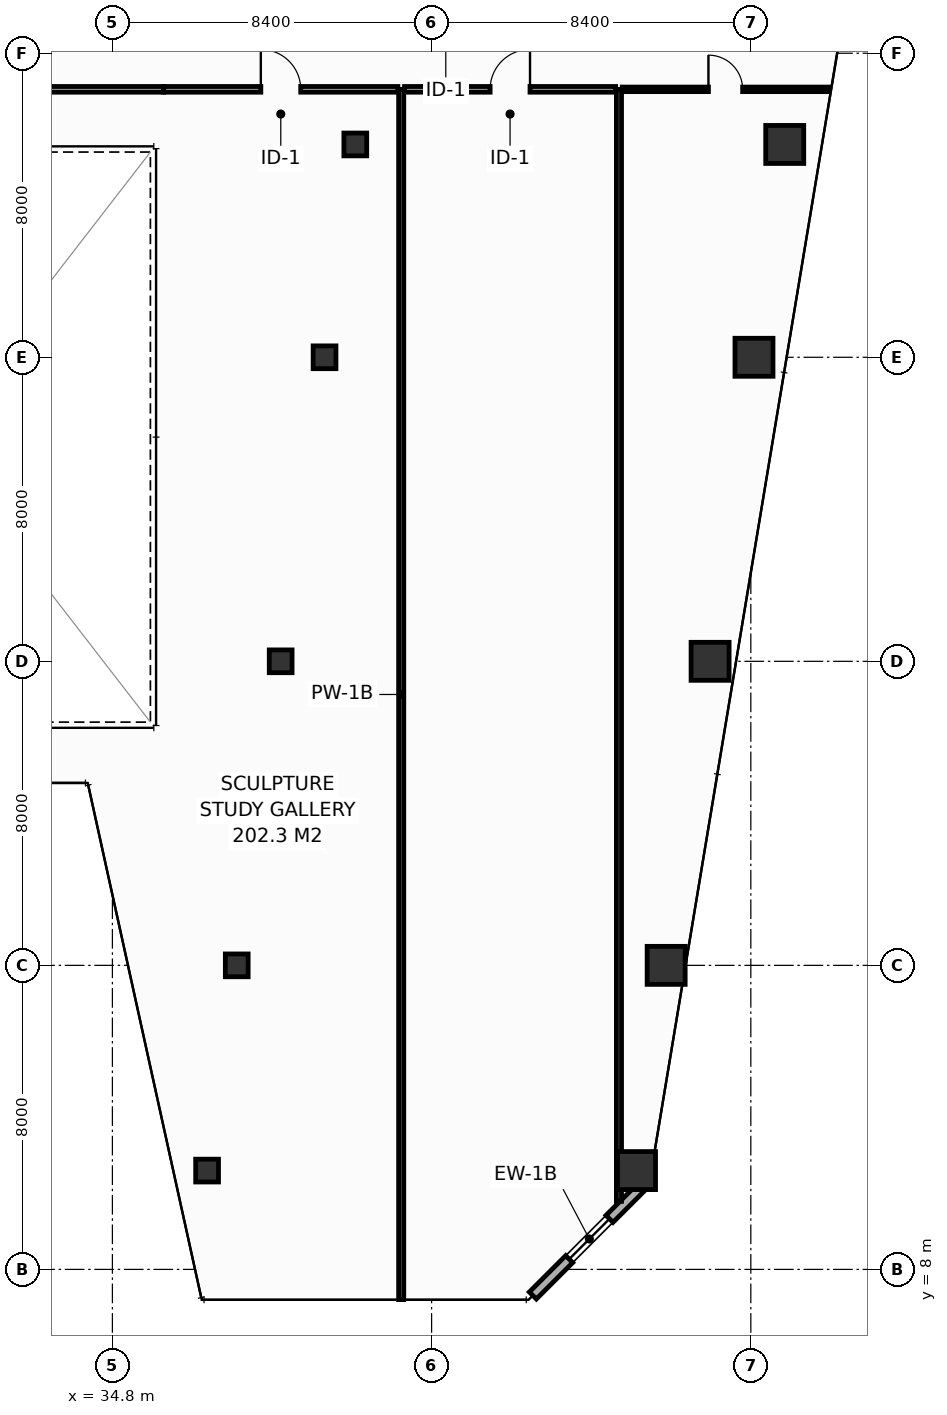
"""IFC4 building model, lengths in metres.
Left out: names, types, materials, properties, quantities, classifications, styles, units other than length and angle.
Written with IfcOpenShell. Run it as: python <this file> out.ifc"""

import sys

from ifc_helpers import new_model, si_unit, direction, frame, frame_2d, origin, origin_2d, place, context, subcontext, project, spatial, rectangle, hollow_rectangle, extrude, element, fill, save


model = new_model("IFC4")
c1 = context("Model", 3, precision=1e-05, world=origin(), true_north=direction((0.0, 1.0)))
c2 = subcontext(c1, "Body", "Model", "MODEL_VIEW")
j1 = project(units=[si_unit("LENGTHUNIT", "METRE"), si_unit("PLANEANGLEUNIT", "RADIAN")], contexts=[c1])
p1 = place(None, origin())
s1 = spatial("IfcSite", under=j1, at=p1, CompositionType="ELEMENT")
p2 = place(p1, origin())
s2 = spatial("IfcBuilding", under=s1, at=p2, CompositionType="ELEMENT")
p3 = place(p2, frame((0.0, 0.0, 119.2)))
s3 = spatial("IfcBuildingStorey", under=s2, at=p3, CompositionType="ELEMENT", Elevation=119.2)
p4 = place(p3, frame((48.592, 10.6, 0.0), z_axis=(0.0, 0.0, 1.0), x_axis=(1.0, 0.0, 0.0)))
e1 = element("IfcColumn", 1, at=p4, inside=s3, PredefinedType="COLUMN", context=c2, shape_type="SweptSolid", body=[
    extrude(hollow_rectangle(XDim=1.0, YDim=1.0, WallThickness=0.045, at=origin_2d()), origin(), (0.0, 0.0, 1.0), 4.4),
])
p5 = place(p3, frame((37.292, 10.6, 0.0), z_axis=(0.0, 0.0, 1.0), x_axis=(1.0, 0.0, 0.0)))
e2 = element("IfcColumn", 2, at=p5, inside=s3, PredefinedType="COLUMN", context=c2, shape_type="SweptSolid", body=[
    extrude(hollow_rectangle(XDim=0.6, YDim=0.6, WallThickness=0.028, at=origin_2d()), origin(), (0.0, 0.0, 1.0), 4.4),
])
p6 = place(p3, frame((49.372, 16.0, 0.0), z_axis=(0.0, 0.0, 1.0), x_axis=(1.0, 0.0, 0.0)))
e3 = element("IfcColumn", 3, at=p6, inside=s3, PredefinedType="COLUMN", context=c2, shape_type="SweptSolid", body=[
    extrude(hollow_rectangle(XDim=1.0, YDim=1.0, WallThickness=0.045, at=origin_2d()), origin(), (0.0, 0.0, 1.0), 4.4),
])
p7 = place(p3, frame((38.072, 16.0, 0.0), z_axis=(0.0, 0.0, 1.0), x_axis=(1.0, 0.0, 0.0)))
e4 = element("IfcColumn", 4, at=p7, inside=s3, PredefinedType="COLUMN", context=c2, shape_type="SweptSolid", body=[
    extrude(hollow_rectangle(XDim=0.6, YDim=0.6, WallThickness=0.028, at=origin_2d()), origin(), (0.0, 0.0, 1.0), 4.4),
])
p8 = place(p3, frame((50.528, 24.0, 0.0), z_axis=(0.0, 0.0, 1.0), x_axis=(1.0, 0.0, 0.0)))
e5 = element("IfcColumn", 5, at=p8, inside=s3, PredefinedType="COLUMN", context=c2, shape_type="SweptSolid", body=[
    extrude(hollow_rectangle(XDim=1.0, YDim=1.0, WallThickness=0.045, at=origin_2d()), origin(), (0.0, 0.0, 1.0), 4.4),
])
p9 = place(p3, frame((39.228, 24.0, 0.0), z_axis=(0.0, 0.0, 1.0), x_axis=(1.0, 0.0, 0.0)))
e6 = element("IfcColumn", 6, at=p9, inside=s3, PredefinedType="COLUMN", context=c2, shape_type="SweptSolid", body=[
    extrude(hollow_rectangle(XDim=0.6, YDim=0.6, WallThickness=0.028, at=origin_2d()), origin(), (0.0, 0.0, 1.0), 4.4),
])
p10 = place(p3, frame((51.683, 32.0, 0.0), z_axis=(0.0, 0.0, 1.0), x_axis=(1.0, 0.0, 0.0)))
e7 = element("IfcColumn", 7, at=p10, inside=s3, PredefinedType="COLUMN", context=c2, shape_type="SweptSolid", body=[
    extrude(hollow_rectangle(XDim=1.0, YDim=1.0, WallThickness=0.045, at=origin_2d()), origin(), (0.0, 0.0, 1.0), 4.4),
])
p11 = place(p3, frame((40.383, 32.0, 0.0), z_axis=(0.0, 0.0, 1.0), x_axis=(1.0, 0.0, 0.0)))
e8 = element("IfcColumn", 8, at=p11, inside=s3, PredefinedType="COLUMN", context=c2, shape_type="SweptSolid", body=[
    extrude(hollow_rectangle(XDim=0.6, YDim=0.6, WallThickness=0.028, at=origin_2d()), origin(), (0.0, 0.0, 1.0), 4.4),
])
p12 = place(p3, frame((52.492, 37.6, 0.0), z_axis=(0.0, 0.0, 1.0), x_axis=(1.0, 0.0, 0.0)))
e9 = element("IfcColumn", 9, at=p12, inside=s3, PredefinedType="COLUMN", context=c2, shape_type="SweptSolid", body=[
    extrude(hollow_rectangle(XDim=1.0, YDim=1.0, WallThickness=0.045, at=origin_2d()), origin(), (0.0, 0.0, 1.0), 4.4),
])
p13 = place(p3, frame((41.192, 37.6, 0.0), z_axis=(0.0, 0.0, 1.0), x_axis=(1.0, 0.0, 0.0)))
e10 = element("IfcColumn", 10, at=p13, inside=s3, PredefinedType="COLUMN", context=c2, shape_type="SweptSolid", body=[
    extrude(hollow_rectangle(XDim=0.6, YDim=0.6, WallThickness=0.028, at=origin_2d()), origin(), (0.0, 0.0, 1.0), 4.4),
])
p14 = place(p3, frame((45.864, 7.313, 0.0), z_axis=(0.0, 0.0, 1.0), x_axis=(0.70707775441, 0.707135806771, 0.0)))
e11 = element("IfcWall", 11, at=p14, inside=s3, PredefinedType="STANDARD", context=c2, shape_type="SweptSolid", body=[
    extrude(rectangle(XDim=4.206, YDim=0.26, at=frame_2d((2.103, 0.0))), origin(), (0.0, 0.0, 1.0), 3.95),
])
p15 = place(p14, frame((1.353, 0.0, 0.9)))
e12 = element("IfcOpeningElement", 12, at=p15, cuts=e11, PredefinedType="OPENING", context=c2, shape_type="SweptSolid", body=[
    extrude(rectangle(XDim=1.5, YDim=1.85, at=frame_2d((0.75, 0.925))), frame((0.0, 0.14, 0.0), z_axis=(0.0, -1.0, 0.0), x_axis=(1.0, 0.0, 0.0)), (0.0, 0.0, 1.0), 0.28),
])
p16 = place(p3, frame((42.4, 7.205, 0.0), z_axis=(0.0, 0.0, 1.0), x_axis=(0.0, 1.0, 0.0)))
e13 = element("IfcWall", 13, at=p16, inside=s3, PredefinedType="PARTITIONING", context=c2, shape_type="SweptSolid", body=[
    extrude(rectangle(XDim=31.845, YDim=0.135, at=frame_2d((15.922, 0.0))), origin(), (0.0, 0.0, 1.0), 3.135),
])
p17 = place(p3, frame((48.13, 9.791, 0.0), z_axis=(0.0, 0.0, 1.0), x_axis=(0.0, 1.0, 0.0)))
e14 = element("IfcWall", 14, at=p17, inside=s3, PredefinedType="PARTITIONING", context=c2, shape_type="SweptSolid", body=[
    extrude(rectangle(XDim=29.259, YDim=0.135, at=frame_2d((14.629, 0.0))), origin(), (0.0, 0.0, 1.0), 3.135),
])
p18 = place(p3, frame((23.85, 39.05, 0.0), z_axis=(0.0, 0.0, 1.0), x_axis=(1.0, 0.0, 0.0)))
e15 = element("IfcWall", 15, at=p18, inside=s3, PredefinedType="PARTITIONING", context=c2, shape_type="SweptSolid", body=[
    extrude(rectangle(XDim=12.3, YDim=0.15, at=frame_2d((6.15, 0.0))), origin(), (0.0, 0.0, 1.0), 3.95),
])
p19 = place(p3, frame((36.15, 39.05, 0.0), z_axis=(0.0, 0.0, 1.0), x_axis=(1.0, 0.0, 0.0)))
e16 = element("IfcWall", 16, at=p19, inside=s3, PredefinedType="PARTITIONING", context=c2, shape_type="SweptSolid", body=[
    extrude(rectangle(XDim=6.163, YDim=0.15, at=frame_2d((3.081, 0.0))), origin(), (0.0, 0.0, 1.0), 3.135),
])
p20 = place(p19, frame((2.556, 0.0, 0.0)))
e17 = element("IfcOpeningElement", 17, at=p20, cuts=e16, PredefinedType="OPENING", context=c2, shape_type="SweptSolid", body=[
    extrude(rectangle(XDim=1.05, YDim=2.15, at=frame_2d((0.525, 1.075))), frame((0.0, 0.085, 0.0), z_axis=(0.0, -1.0, 0.0), x_axis=(1.0, 0.0, 0.0)), (0.0, 0.0, 1.0), 0.17),
])
p21 = place(p3, frame((42.488, 39.05, 0.0), z_axis=(0.0, 0.0, 1.0), x_axis=(1.0, 0.0, 0.0)))
e18 = element("IfcWall", 18, at=p21, inside=s3, PredefinedType="PARTITIONING", context=c2, shape_type="SweptSolid", body=[
    extrude(rectangle(XDim=5.555, YDim=0.15, at=frame_2d((2.777, 0.0))), origin(), (0.0, 0.0, 1.0), 3.95),
])
p22 = place(p21, frame((2.252, 0.0, 0.0)))
e19 = element("IfcOpeningElement", 19, at=p22, cuts=e18, PredefinedType="OPENING", context=c2, shape_type="SweptSolid", body=[
    extrude(rectangle(XDim=1.05, YDim=2.15, at=frame_2d((0.525, 1.075))), frame((0.0, 0.085, 0.0), z_axis=(0.0, -1.0, 0.0), x_axis=(1.0, 0.0, 0.0)), (0.0, 0.0, 1.0), 0.17),
])
p23 = place(p3, frame((48.218, 39.05, 0.0), z_axis=(0.0, 0.0, 1.0), x_axis=(1.0, 0.0, 0.0)))
e20 = element("IfcWall", 20, at=p23, inside=s3, PredefinedType="PARTITIONING", context=c2, shape_type="SweptSolid", body=[
    extrude(rectangle(XDim=5.434, YDim=0.12, at=frame_2d((2.717, 0.0))), origin(), (0.0, 0.0, 1.0), 3.435),
])
p24 = place(p23, frame((2.267, 0.0, 0.0)))
e21 = element("IfcOpeningElement", 21, at=p24, cuts=e20, PredefinedType="OPENING", context=c2, shape_type="SweptSolid", body=[
    extrude(rectangle(XDim=0.9, YDim=2.1, at=frame_2d((0.45, 1.05))), frame((0.0, 0.07, 0.0), z_axis=(0.0, -1.0, 0.0), x_axis=(1.0, 0.0, 0.0)), (0.0, 0.0, 1.0), 0.14),
])
p25 = place(p15, origin())
e22 = element("IfcWindow", 22, at=p25, inside=s3, PartitioningType="SINGLE_PANEL", PredefinedType="WINDOW", context=c2, shape_type="SweptSolid", body=[
    extrude(rectangle(XDim=1.5, YDim=1.85, at=frame_2d((0.75, 0.925))), frame((0.0, 0.03, 0.0), z_axis=(0.0, -1.0, 0.0), x_axis=(1.0, 0.0, 0.0)), (0.0, 0.0, 1.0), 0.06),
])
fill(e12, e22)
p26 = place(p20, origin())
e23 = element("IfcDoor", 23, at=p26, inside=s3, OperationType="SINGLE_SWING_LEFT", PredefinedType="DOOR", context=c2, shape_type="SweptSolid", body=[
    extrude(rectangle(XDim=1.05, YDim=2.15, at=frame_2d((0.525, 1.075))), frame((0.0, 0.025, 0.0), z_axis=(0.0, -1.0, 0.0), x_axis=(1.0, 0.0, 0.0)), (0.0, 0.0, 1.0), 0.05),
])
fill(e17, e23)
p27 = place(p22, origin())
e24 = element("IfcDoor", 24, at=p27, inside=s3, OperationType="SINGLE_SWING_RIGHT", PredefinedType="DOOR", context=c2, shape_type="SweptSolid", body=[
    extrude(rectangle(XDim=1.05, YDim=2.15, at=frame_2d((0.525, 1.075))), frame((0.0, 0.025, 0.0), z_axis=(0.0, -1.0, 0.0), x_axis=(1.0, 0.0, 0.0)), (0.0, 0.0, 1.0), 0.05),
])
fill(e19, e24)
p28 = place(p24, origin())
e25 = element("IfcDoor", 25, at=p28, inside=s3, OperationType="SINGLE_SWING_LEFT", PredefinedType="DOOR", context=c2, shape_type="SweptSolid", body=[
    extrude(rectangle(XDim=0.9, YDim=2.1, at=frame_2d((0.45, 1.05))), frame((0.0, 0.025, 0.0), z_axis=(0.0, -1.0, 0.0), x_axis=(1.0, 0.0, 0.0)), (0.0, 0.0, 1.0), 0.05),
])
fill(e21, e25)
save(model, sys.argv[1])
